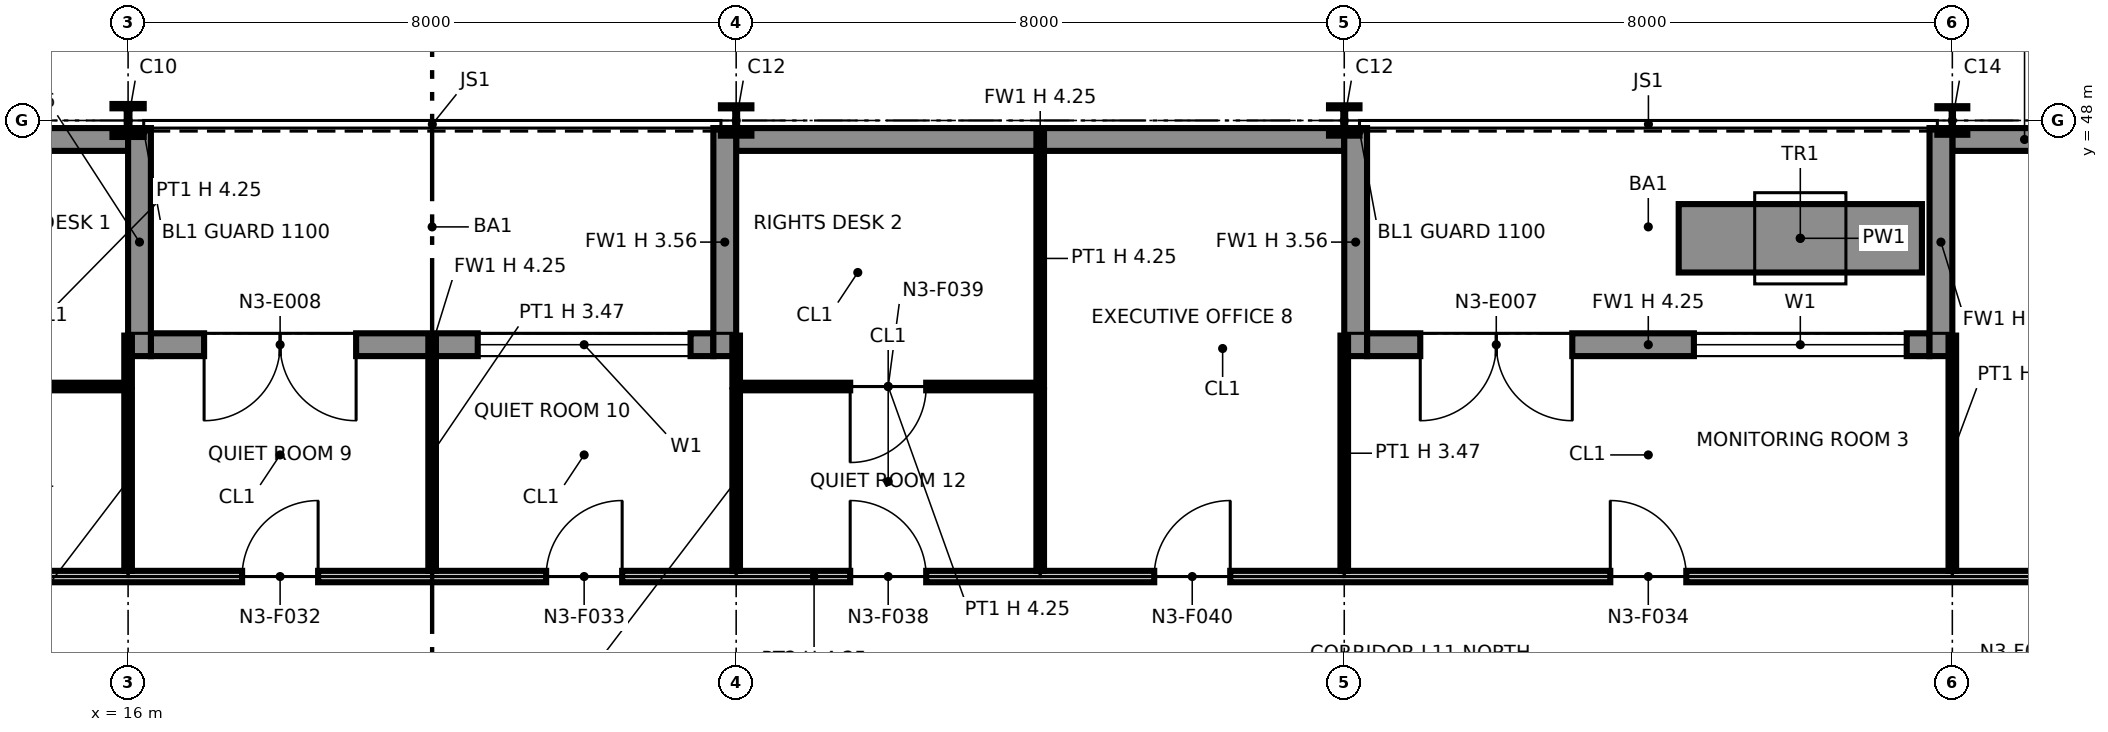
"""IFC4 building model, lengths in metres.
Left out: names, types, materials, properties, quantities, classifications, styles, units other than length and angle.
Written with IfcOpenShell. Run it as: python <this file> out.ifc"""

import sys

from ifc_helpers import new_model, si_unit, direction, frame, frame_2d, origin, origin_2d, place, context, subcontext, project, spatial, rectangle, i_section, extrude, element, fill, save


model = new_model("IFC4")
c1 = context("Model", 3, precision=1e-05, world=origin(), true_north=direction((0.0, 1.0)))
c2 = subcontext(c1, "Body", "Model", "MODEL_VIEW")
j1 = project(units=[si_unit("LENGTHUNIT", "METRE"), si_unit("PLANEANGLEUNIT", "RADIAN")], contexts=[c1])
p1 = place(None, origin())
s1 = spatial("IfcSite", under=j1, at=p1, CompositionType="ELEMENT")
p2 = place(p1, origin())
s2 = spatial("IfcBuilding", under=s1, at=p2, CompositionType="ELEMENT")
p3 = place(p2, frame((0.0, 0.0, 65.6)))
s3 = spatial("IfcBuildingStorey", under=s2, at=p3, CompositionType="ELEMENT", Elevation=65.6)
p4 = place(p3, frame((16.0, 48.0, 0.0), z_axis=(0.0, 0.0, 1.0), x_axis=(1.0, 0.0, 0.0)))
e1 = element("IfcColumn", 1, at=p4, inside=s3, PredefinedType="COLUMN", context=c2, shape_type="SweptSolid", body=[
    extrude(i_section(OverallWidth=0.411, OverallDepth=0.434, WebThickness=0.036, FlangeThickness=0.057, at=origin_2d()), origin(), (0.0, 0.0, 1.0), 4.25),
])
for number, where, z_axis, x_axis in (
    (2, (24.0, 48.0, 0.0), (0.0, 0.0, 1.0), (1.0, 0.0, 0.0)),
    (3, (32.0, 48.0, 0.0), (0.0, 0.0, 1.0), (1.0, 0.0, 0.0)),
):
    element("IfcColumn", number, at=place(p3, frame(where, z_axis=z_axis, x_axis=x_axis)), inside=s3, PredefinedType="COLUMN", context=c2, shape_type="SweptSolid", body=[
        extrude(i_section(OverallWidth=0.401, OverallDepth=0.399, WebThickness=0.025, FlangeThickness=0.04, at=origin_2d()), origin(), (0.0, 0.0, 1.0), 4.25),
    ])
p5 = place(p3, frame((40.0, 48.0, 0.0), z_axis=(0.0, 0.0, 1.0), x_axis=(1.0, 0.0, 0.0)))
e4 = element("IfcColumn", 4, at=p5, inside=s3, PredefinedType="COLUMN", context=c2, shape_type="SweptSolid", body=[
    extrude(i_section(OverallWidth=0.394, OverallDepth=0.376, WebThickness=0.017, FlangeThickness=0.028, at=origin_2d()), origin(), (0.0, 0.0, 1.0), 4.25),
])
p6 = place(p3, frame((41.9, 47.75, 0.0), z_axis=(0.0, 0.0, 1.0), x_axis=(-1.0, 0.0, 0.0)))
e5 = element("IfcWall", 5, at=p6, inside=s3, PredefinedType="SOLIDWALL", context=c2, shape_type="SweptSolid", body=[
    extrude(rectangle(XDim=1.9, YDim=0.3, at=frame_2d((0.95, 0.0))), origin(), (0.0, 0.0, 1.0), 4.25),
])
p7 = place(p3, frame((39.7, 45.05, 0.0), z_axis=(0.0, 0.0, 1.0), x_axis=(-1.0, 0.0, 0.0)))
e6 = element("IfcWall", 6, at=p7, inside=s3, PredefinedType="SOLIDWALL", context=c2, shape_type="SweptSolid", body=[
    extrude(rectangle(XDim=7.4, YDim=0.3, at=frame_2d((3.7, 0.0))), origin(), (0.0, 0.0, 1.0), 4.25),
])
p8 = place(p7, frame((0.3, 0.0, 0.9)))
e7 = element("IfcOpeningElement", 7, at=p8, cuts=e6, PredefinedType="OPENING", context=c2, shape_type="SweptSolid", body=[
    extrude(rectangle(XDim=2.8, YDim=2.2, at=frame_2d((1.4, 1.1))), frame((0.0, 0.16, 0.0), z_axis=(0.0, -1.0, 0.0), x_axis=(1.0, 0.0, 0.0)), (0.0, 0.0, 1.0), 0.32),
])
p9 = place(p7, frame((4.7, 0.0, 0.0)))
e8 = element("IfcOpeningElement", 8, at=p9, cuts=e6, PredefinedType="OPENING", context=c2, shape_type="SweptSolid", body=[
    extrude(rectangle(XDim=2.0, YDim=2.4, at=frame_2d((1.0, 1.2))), frame((0.0, 0.16, 0.0), z_axis=(0.0, -1.0, 0.0), x_axis=(1.0, 0.0, 0.0)), (0.0, 0.0, 1.0), 0.32),
])
p10 = place(p3, frame((39.85, 47.9, 0.0), z_axis=(0.0, 0.0, 1.0), x_axis=(0.0, -1.0, 0.0)))
e9 = element("IfcWall", 9, at=p10, inside=s3, PredefinedType="SOLIDWALL", context=c2, shape_type="SweptSolid", body=[
    extrude(rectangle(XDim=3.0, YDim=0.3, at=frame_2d((1.5, 0.0))), origin(), (0.0, 0.0, 1.0), 3.469),
])
p11 = place(p3, frame((32.15, 47.9, 0.0), z_axis=(0.0, 0.0, 1.0), x_axis=(0.0, -1.0, 0.0)))
e10 = element("IfcWall", 10, at=p11, inside=s3, PredefinedType="SOLIDWALL", context=c2, shape_type="SweptSolid", body=[
    extrude(rectangle(XDim=3.0, YDim=0.3, at=frame_2d((1.5, 0.0))), origin(), (0.0, 0.0, 1.0), 3.556),
])
p12 = place(p3, frame((32.0, 47.75, 0.0), z_axis=(0.0, 0.0, 1.0), x_axis=(-1.0, 0.0, 0.0)))
e11 = element("IfcWall", 11, at=p12, inside=s3, PredefinedType="SOLIDWALL", context=c2, shape_type="SweptSolid", body=[
    extrude(rectangle(XDim=8.0, YDim=0.3, at=frame_2d((4.0, 0.0))), origin(), (0.0, 0.0, 1.0), 4.25),
])
p13 = place(p3, frame((23.7, 45.05, 0.0), z_axis=(0.0, 0.0, 1.0), x_axis=(-1.0, 0.0, 0.0)))
e12 = element("IfcWall", 12, at=p13, inside=s3, PredefinedType="SOLIDWALL", context=c2, shape_type="SweptSolid", body=[
    extrude(rectangle(XDim=7.4, YDim=0.3, at=frame_2d((3.7, 0.0))), origin(), (0.0, 0.0, 1.0), 4.25),
])
p14 = place(p13, frame((0.3, 0.0, 0.9)))
e13 = element("IfcOpeningElement", 13, at=p14, cuts=e12, PredefinedType="OPENING", context=c2, shape_type="SweptSolid", body=[
    extrude(rectangle(XDim=2.8, YDim=2.2, at=frame_2d((1.4, 1.1))), frame((0.0, 0.16, 0.0), z_axis=(0.0, -1.0, 0.0), x_axis=(1.0, 0.0, 0.0)), (0.0, 0.0, 1.0), 0.32),
])
p15 = place(p13, frame((4.7, 0.0, 0.0)))
e14 = element("IfcOpeningElement", 14, at=p15, cuts=e12, PredefinedType="OPENING", context=c2, shape_type="SweptSolid", body=[
    extrude(rectangle(XDim=2.0, YDim=2.4, at=frame_2d((1.0, 1.2))), frame((0.0, 0.16, 0.0), z_axis=(0.0, -1.0, 0.0), x_axis=(1.0, 0.0, 0.0)), (0.0, 0.0, 1.0), 0.32),
])
for number, where, z_axis, x_axis in (
    (15, (23.85, 47.9, 0.0), (0.0, 0.0, 1.0), (0.0, -1.0, 0.0)),
    (16, (16.15, 47.9, 0.0), (0.0, 0.0, 1.0), (0.0, -1.0, 0.0)),
):
    element("IfcWall", number, at=place(p3, frame(where, z_axis=z_axis, x_axis=x_axis)), inside=s3, PredefinedType="SOLIDWALL", context=c2, shape_type="SweptSolid", body=[
        extrude(rectangle(XDim=3.0, YDim=0.3, at=frame_2d((1.5, 0.0))), origin(), (0.0, 0.0, 1.0), 3.556),
    ])
p16 = place(p3, frame((16.0, 47.75, 0.0), z_axis=(0.0, 0.0, 1.0), x_axis=(-1.0, 0.0, 0.0)))
e17 = element("IfcWall", 17, at=p16, inside=s3, PredefinedType="SOLIDWALL", context=c2, shape_type="SweptSolid", body=[
    extrude(rectangle(XDim=9.9, YDim=0.3, at=frame_2d((4.95, 0.0))), origin(), (0.0, 0.0, 1.0), 4.25),
])
p17 = place(p3, frame((39.6, 46.45, 0.0), z_axis=(0.0, 0.0, 1.0), x_axis=(-1.0, 0.0, 0.0)))
e18 = element("IfcWall", 18, at=p17, inside=s3, PredefinedType="SOLIDWALL", context=c2, shape_type="SweptSolid", body=[
    extrude(rectangle(XDim=3.2, YDim=0.9, at=frame_2d((1.6, 0.0))), origin(), (0.0, 0.0, 1.0), 0.6),
])
p18 = place(p3, frame((8.05, 42.0, 0.0), z_axis=(0.0, 0.0, 1.0), x_axis=(1.0, 0.0, 0.0)))
e19 = element("IfcWall", 19, at=p18, inside=s3, PredefinedType="PARTITIONING", context=c2, shape_type="SweptSolid", body=[
    extrude(rectangle(XDim=33.95, YDim=0.15, at=frame_2d((16.975, 0.0))), origin(), (0.0, 0.0, 1.0), 4.25),
])
p19 = place(p18, frame((9.45, 0.0, 0.0)))
e20 = element("IfcOpeningElement", 20, at=p19, cuts=e19, PredefinedType="OPENING", context=c2, shape_type="SweptSolid", body=[
    extrude(rectangle(XDim=1.0, YDim=2.1, at=frame_2d((0.5, 1.05))), frame((0.0, 0.085, 0.0), z_axis=(0.0, -1.0, 0.0), x_axis=(1.0, 0.0, 0.0)), (0.0, 0.0, 1.0), 0.17),
])
p20 = place(p18, frame((13.45, 0.0, 0.0)))
e21 = element("IfcOpeningElement", 21, at=p20, cuts=e19, PredefinedType="OPENING", context=c2, shape_type="SweptSolid", body=[
    extrude(rectangle(XDim=1.0, YDim=2.1, at=frame_2d((0.5, 1.05))), frame((0.0, 0.085, 0.0), z_axis=(0.0, -1.0, 0.0), x_axis=(1.0, 0.0, 0.0)), (0.0, 0.0, 1.0), 0.17),
])
p21 = place(p18, frame((27.45, 0.0, 0.0)))
e22 = element("IfcOpeningElement", 22, at=p21, cuts=e19, PredefinedType="OPENING", context=c2, shape_type="SweptSolid", body=[
    extrude(rectangle(XDim=1.0, YDim=2.1, at=frame_2d((0.5, 1.05))), frame((0.0, 0.085, 0.0), z_axis=(0.0, -1.0, 0.0), x_axis=(1.0, 0.0, 0.0)), (0.0, 0.0, 1.0), 0.17),
])
p22 = place(p18, frame((1.45, 0.0, 0.0)))
e23 = element("IfcOpeningElement", 23, at=p22, cuts=e19, PredefinedType="OPENING", context=c2, shape_type="SweptSolid", body=[
    extrude(rectangle(XDim=1.0, YDim=2.1, at=frame_2d((0.5, 1.05))), frame((0.0, 0.085, 0.0), z_axis=(0.0, -1.0, 0.0), x_axis=(1.0, 0.0, 0.0)), (0.0, 0.0, 1.0), 0.17),
])
p23 = place(p18, frame((5.45, 0.0, 0.0)))
e24 = element("IfcOpeningElement", 24, at=p23, cuts=e19, PredefinedType="OPENING", context=c2, shape_type="SweptSolid", body=[
    extrude(rectangle(XDim=1.0, YDim=2.1, at=frame_2d((0.5, 1.05))), frame((0.0, 0.085, 0.0), z_axis=(0.0, -1.0, 0.0), x_axis=(1.0, 0.0, 0.0)), (0.0, 0.0, 1.0), 0.17),
])
p24 = place(p18, frame((17.45, 0.0, 0.0)))
e25 = element("IfcOpeningElement", 25, at=p24, cuts=e19, PredefinedType="OPENING", context=c2, shape_type="SweptSolid", body=[
    extrude(rectangle(XDim=1.0, YDim=2.1, at=frame_2d((0.5, 1.05))), frame((0.0, 0.085, 0.0), z_axis=(0.0, -1.0, 0.0), x_axis=(1.0, 0.0, 0.0)), (0.0, 0.0, 1.0), 0.17),
])
p25 = place(p18, frame((21.45, 0.0, 0.0)))
e26 = element("IfcOpeningElement", 26, at=p25, cuts=e19, PredefinedType="OPENING", context=c2, shape_type="SweptSolid", body=[
    extrude(rectangle(XDim=1.0, YDim=2.1, at=frame_2d((0.5, 1.05))), frame((0.0, 0.085, 0.0), z_axis=(0.0, -1.0, 0.0), x_axis=(1.0, 0.0, 0.0)), (0.0, 0.0, 1.0), 0.17),
])
p26 = place(p3, frame((16.0, 42.075, 0.0), z_axis=(0.0, 0.0, 1.0), x_axis=(0.0, 1.0, 0.0)))
e27 = element("IfcWall", 27, at=p26, inside=s3, PredefinedType="PARTITIONING", context=c2, shape_type="SweptSolid", body=[
    extrude(rectangle(XDim=2.375, YDim=0.1, at=frame_2d((1.188, 0.0))), origin(), (0.0, 0.0, 1.0), 3.47),
])
p27 = place(p3, frame((20.0, 42.075, 0.0), z_axis=(0.0, 0.0, 1.0), x_axis=(0.0, 1.0, 0.0)))
e28 = element("IfcWall", 28, at=p27, inside=s3, PredefinedType="PARTITIONING", context=c2, shape_type="SweptSolid", body=[
    extrude(rectangle(XDim=3.095, YDim=0.1, at=frame_2d((1.547, 0.0))), origin(), (0.0, 0.0, 1.0), 3.47),
])
for number, where, z_axis, x_axis in (
    (29, (24.0, 42.075, 0.0), (0.0, 0.0, 1.0), (0.0, 1.0, 0.0)),
    (30, (28.0, 42.075, 0.0), (0.0, 0.0, 1.0), (0.0, 1.0, 0.0)),
):
    element("IfcWall", number, at=place(p3, frame(where, z_axis=z_axis, x_axis=x_axis)), inside=s3, PredefinedType="PARTITIONING", context=c2, shape_type="SweptSolid", body=[
        extrude(rectangle(XDim=2.375, YDim=0.1, at=frame_2d((1.188, 0.0))), origin(), (0.0, 0.0, 1.0), 3.47),
    ])
for number, where, z_axis, x_axis in (
    (31, (32.0, 42.075, 0.0), (0.0, 0.0, 1.0), (0.0, 1.0, 0.0)),
    (32, (40.0, 42.075, 0.0), (0.0, 0.0, 1.0), (0.0, 1.0, 0.0)),
):
    element("IfcWall", number, at=place(p3, frame(where, z_axis=z_axis, x_axis=x_axis)), inside=s3, PredefinedType="PARTITIONING", context=c2, shape_type="SweptSolid", body=[
        extrude(rectangle(XDim=3.095, YDim=0.1, at=frame_2d((1.547, 0.0))), origin(), (0.0, 0.0, 1.0), 3.47),
    ])
p28 = place(p3, frame((12.05, 44.5, 0.0), z_axis=(0.0, 0.0, 1.0), x_axis=(1.0, 0.0, 0.0)))
e33 = element("IfcWall", 33, at=p28, inside=s3, PredefinedType="PARTITIONING", context=c2, shape_type="SweptSolid", body=[
    extrude(rectangle(XDim=3.9, YDim=0.1, at=frame_2d((1.95, 0.0))), origin(), (0.0, 0.0, 1.0), 4.25),
])
p29 = place(p28, frame((1.45, 0.0, 0.0)))
e34 = element("IfcOpeningElement", 34, at=p29, cuts=e33, PredefinedType="OPENING", context=c2, shape_type="SweptSolid", body=[
    extrude(rectangle(XDim=1.0, YDim=2.1, at=frame_2d((0.5, 1.05))), frame((0.0, 0.06, 0.0), z_axis=(0.0, -1.0, 0.0), x_axis=(1.0, 0.0, 0.0)), (0.0, 0.0, 1.0), 0.12),
])
p30 = place(p3, frame((16.0, 44.5, 0.0), z_axis=(0.0, 0.0, 1.0), x_axis=(0.0, 1.0, 0.0)))
e35 = element("IfcWall", 35, at=p30, inside=s3, PredefinedType="PARTITIONING", context=c2, shape_type="SweptSolid", body=[
    extrude(rectangle(XDim=0.67, YDim=0.1, at=frame_2d((0.335, 0.0))), origin(), (0.0, 0.0, 1.0), 3.47),
])
p31 = place(p3, frame((24.05, 44.5, 0.0), z_axis=(0.0, 0.0, 1.0), x_axis=(1.0, 0.0, 0.0)))
e36 = element("IfcWall", 36, at=p31, inside=s3, PredefinedType="PARTITIONING", context=c2, shape_type="SweptSolid", body=[
    extrude(rectangle(XDim=3.9, YDim=0.1, at=frame_2d((1.95, 0.0))), origin(), (0.0, 0.0, 1.0), 4.25),
])
p32 = place(p31, frame((2.45, 0.0, 0.0), z_axis=(0.0, 0.0, 1.0), x_axis=(-1.0, 0.0, 0.0)))
e37 = element("IfcOpeningElement", 37, at=p32, cuts=e36, PredefinedType="OPENING", context=c2, shape_type="SweptSolid", body=[
    extrude(rectangle(XDim=1.0, YDim=2.1, at=frame_2d((0.5, 1.05))), frame((0.0, 0.06, 0.0), z_axis=(0.0, -1.0, 0.0), x_axis=(1.0, 0.0, 0.0)), (0.0, 0.0, 1.0), 0.12),
])
p33 = place(p3, frame((24.0, 44.5, 0.0), z_axis=(0.0, 0.0, 1.0), x_axis=(0.0, 1.0, 0.0)))
e38 = element("IfcWall", 38, at=p33, inside=s3, PredefinedType="PARTITIONING", context=c2, shape_type="SweptSolid", body=[
    extrude(rectangle(XDim=0.67, YDim=0.1, at=frame_2d((0.335, 0.0))), origin(), (0.0, 0.0, 1.0), 3.47),
])
p34 = place(p3, frame((28.0, 44.5, 0.0), z_axis=(0.0, 0.0, 1.0), x_axis=(0.0, 1.0, 0.0)))
e39 = element("IfcWall", 39, at=p34, inside=s3, PredefinedType="PARTITIONING", context=c2, shape_type="SweptSolid", body=[
    extrude(rectangle(XDim=3.37, YDim=0.1, at=frame_2d((1.685, 0.0))), origin(), (0.0, 0.0, 1.0), 4.25),
])
p35 = place(p8, origin())
e40 = element("IfcWindow", 40, at=p35, inside=s3, PartitioningType="SINGLE_PANEL", PredefinedType="WINDOW", context=c2, shape_type="SweptSolid", body=[
    extrude(rectangle(XDim=2.8, YDim=2.2, at=frame_2d((1.4, 1.1))), frame((0.0, 0.03, 0.0), z_axis=(0.0, -1.0, 0.0), x_axis=(1.0, 0.0, 0.0)), (0.0, 0.0, 1.0), 0.06),
])
fill(e7, e40)
p36 = place(p9, origin())
e41 = element("IfcDoor", 41, at=p36, inside=s3, OperationType="DOUBLE_DOOR_SINGLE_SWING", PredefinedType="DOOR", context=c2, shape_type="SweptSolid", body=[
    extrude(rectangle(XDim=2.0, YDim=2.4, at=frame_2d((1.0, 1.2))), frame((0.0, 0.025, 0.0), z_axis=(0.0, -1.0, 0.0), x_axis=(1.0, 0.0, 0.0)), (0.0, 0.0, 1.0), 0.05),
])
fill(e8, e41)
p37 = place(p14, origin())
e42 = element("IfcWindow", 42, at=p37, inside=s3, PartitioningType="SINGLE_PANEL", PredefinedType="WINDOW", context=c2, shape_type="SweptSolid", body=[
    extrude(rectangle(XDim=2.8, YDim=2.2, at=frame_2d((1.4, 1.1))), frame((0.0, 0.03, 0.0), z_axis=(0.0, -1.0, 0.0), x_axis=(1.0, 0.0, 0.0)), (0.0, 0.0, 1.0), 0.06),
])
fill(e13, e42)
p38 = place(p15, origin())
e43 = element("IfcDoor", 43, at=p38, inside=s3, OperationType="DOUBLE_DOOR_SINGLE_SWING", PredefinedType="DOOR", context=c2, shape_type="SweptSolid", body=[
    extrude(rectangle(XDim=2.0, YDim=2.4, at=frame_2d((1.0, 1.2))), frame((0.0, 0.025, 0.0), z_axis=(0.0, -1.0, 0.0), x_axis=(1.0, 0.0, 0.0)), (0.0, 0.0, 1.0), 0.05),
])
fill(e14, e43)
p39 = place(p19, origin())
e44 = element("IfcDoor", 44, at=p39, inside=s3, OperationType="SINGLE_SWING_RIGHT", PredefinedType="DOOR", context=c2, shape_type="SweptSolid", body=[
    extrude(rectangle(XDim=1.0, YDim=2.1, at=frame_2d((0.5, 1.05))), frame((0.0, 0.025, 0.0), z_axis=(0.0, -1.0, 0.0), x_axis=(1.0, 0.0, 0.0)), (0.0, 0.0, 1.0), 0.05),
])
fill(e20, e44)
p40 = place(p20, origin())
e45 = element("IfcDoor", 45, at=p40, inside=s3, OperationType="SINGLE_SWING_RIGHT", PredefinedType="DOOR", context=c2, shape_type="SweptSolid", body=[
    extrude(rectangle(XDim=1.0, YDim=2.1, at=frame_2d((0.5, 1.05))), frame((0.0, 0.025, 0.0), z_axis=(0.0, -1.0, 0.0), x_axis=(1.0, 0.0, 0.0)), (0.0, 0.0, 1.0), 0.05),
])
fill(e21, e45)
p41 = place(p21, origin())
e46 = element("IfcDoor", 46, at=p41, inside=s3, OperationType="SINGLE_SWING_LEFT", PredefinedType="DOOR", context=c2, shape_type="SweptSolid", body=[
    extrude(rectangle(XDim=1.0, YDim=2.1, at=frame_2d((0.5, 1.05))), frame((0.0, 0.025, 0.0), z_axis=(0.0, -1.0, 0.0), x_axis=(1.0, 0.0, 0.0)), (0.0, 0.0, 1.0), 0.05),
])
fill(e22, e46)
p42 = place(p24, origin())
e47 = element("IfcDoor", 47, at=p42, inside=s3, OperationType="SINGLE_SWING_LEFT", PredefinedType="DOOR", context=c2, shape_type="SweptSolid", body=[
    extrude(rectangle(XDim=1.0, YDim=2.1, at=frame_2d((0.5, 1.05))), frame((0.0, 0.025, 0.0), z_axis=(0.0, -1.0, 0.0), x_axis=(1.0, 0.0, 0.0)), (0.0, 0.0, 1.0), 0.05),
])
fill(e25, e47)
p43 = place(p32, origin())
e48 = element("IfcDoor", 48, at=p43, inside=s3, OperationType="SINGLE_SWING_RIGHT", PredefinedType="DOOR", context=c2, shape_type="SweptSolid", body=[
    extrude(rectangle(XDim=1.0, YDim=2.1, at=frame_2d((0.5, 1.05))), frame((0.0, 0.025, 0.0), z_axis=(0.0, -1.0, 0.0), x_axis=(1.0, 0.0, 0.0)), (0.0, 0.0, 1.0), 0.05),
])
fill(e37, e48)
p44 = place(p25, origin())
e49 = element("IfcDoor", 49, at=p44, inside=s3, OperationType="SINGLE_SWING_RIGHT", PredefinedType="DOOR", context=c2, shape_type="SweptSolid", body=[
    extrude(rectangle(XDim=1.0, YDim=2.1, at=frame_2d((0.5, 1.05))), frame((0.0, 0.025, 0.0), z_axis=(0.0, -1.0, 0.0), x_axis=(1.0, 0.0, 0.0)), (0.0, 0.0, 1.0), 0.05),
])
fill(e26, e49)
save(model, sys.argv[1])
